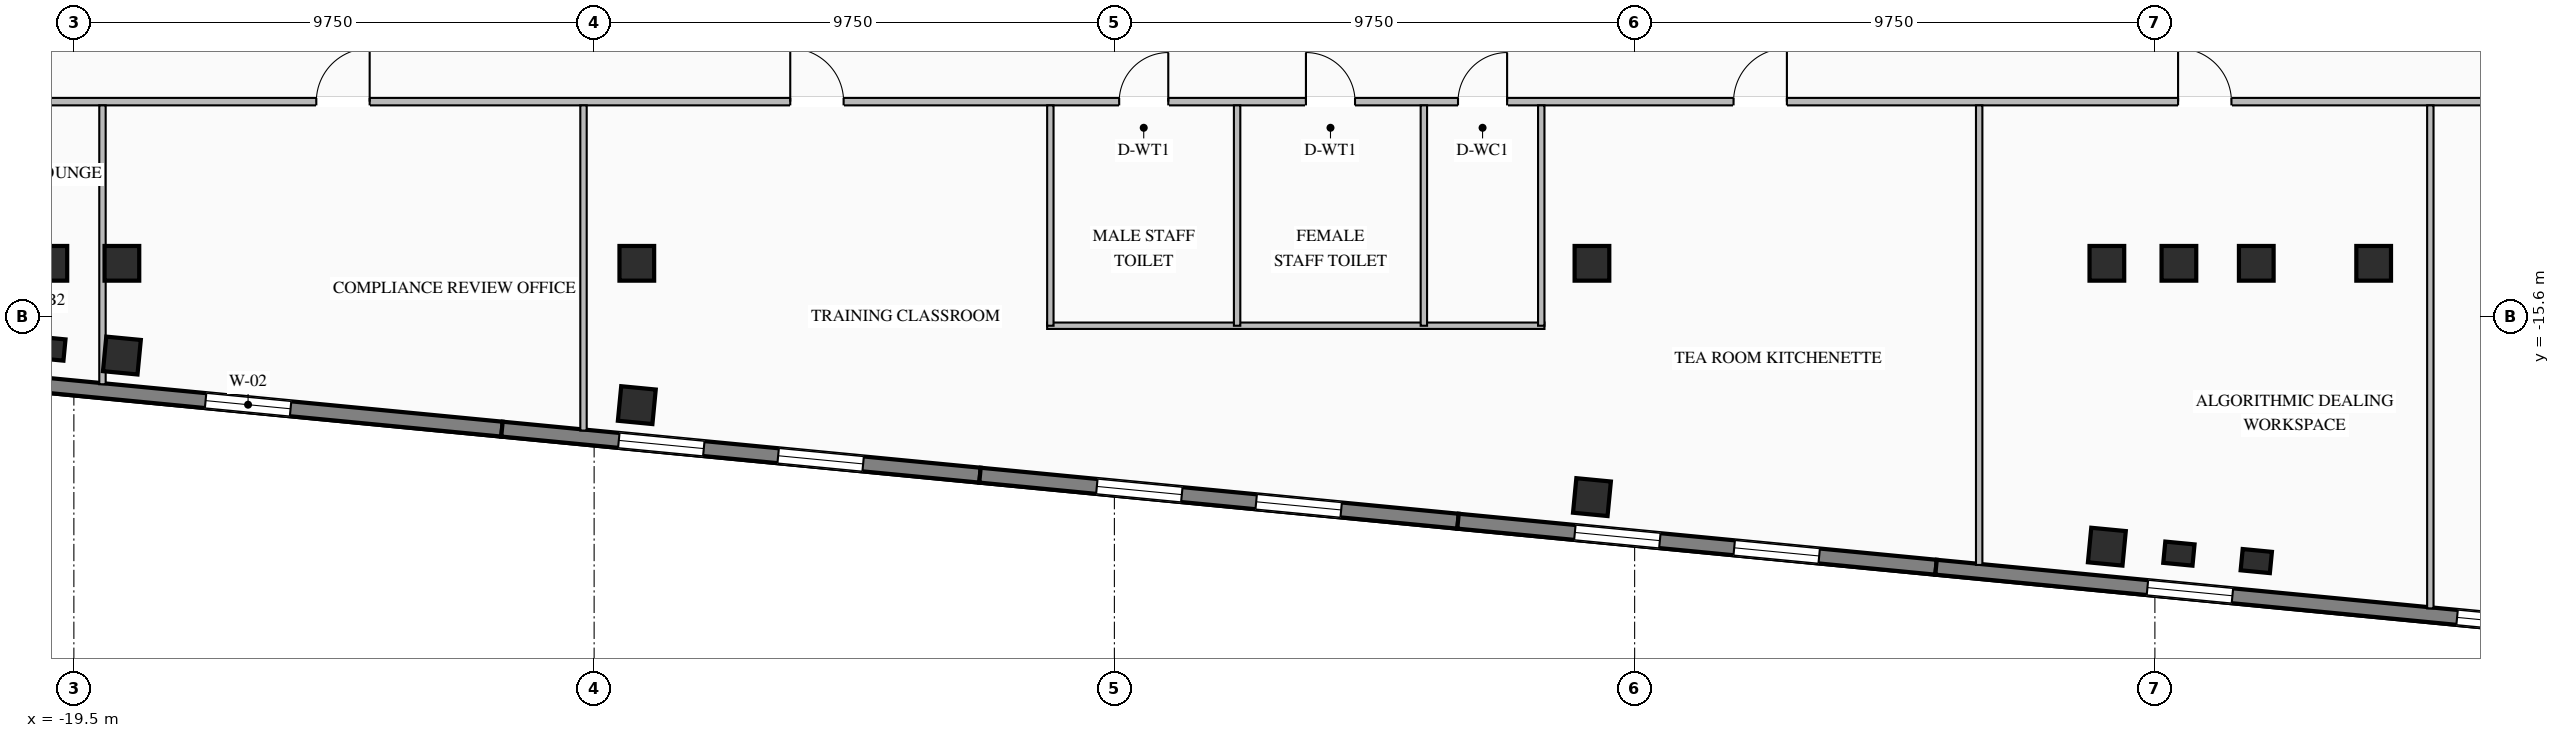
"""IFC4 building model, lengths in metres.
Left out: names, types, materials, properties, quantities, classifications, styles, units other than length and angle.
Written with IfcOpenShell. Run it as: python <this file> out.ifc"""

import sys

from ifc_helpers import new_model, si_unit, direction, frame, frame_2d, origin, origin_2d, place, context, subcontext, project, spatial, rectangle, i_section, extrude, element, fill, save


model = new_model("IFC4")
c1 = context("Model", 3, precision=1e-05, world=origin(), true_north=direction((0.0, 1.0)))
c2 = subcontext(c1, "Body", "Model", "MODEL_VIEW")
j1 = project(units=[si_unit("LENGTHUNIT", "METRE"), si_unit("PLANEANGLEUNIT", "RADIAN")], contexts=[c1])
p1 = place(None, origin())
s1 = spatial("IfcSite", under=j1, at=p1, CompositionType="ELEMENT")
p2 = place(p1, origin())
s2 = spatial("IfcBuilding", under=s1, at=p2, CompositionType="ELEMENT")
p3 = place(p2, frame((0.0, 0.0, 188.0)))
s3 = spatial("IfcBuildingStorey", under=s2, at=p3, CompositionType="ELEMENT", Elevation=188.0)
for number, where, z_axis, x_axis in (
    (1, (-19.95, -14.6, 0.0), (0.0, 0.0, 1.0), (1.0, 0.0, 0.0)),
    (2, (-18.6, -14.6, 0.0), (0.0, 0.0, 1.0), (1.0, 0.0, 0.0)),
    (3, (-8.95, -14.6, 0.0), (0.0, 0.0, 1.0), (1.0, 0.0, 0.0)),
    (4, (8.95, -14.6, 0.0), (0.0, 0.0, 1.0), (1.0, 0.0, 0.0)),
    (5, (18.6, -14.6, 0.0), (0.0, 0.0, 1.0), (1.0, 0.0, 0.0)),
    (6, (19.95, -14.6, 0.0), (0.0, 0.0, 1.0), (1.0, 0.0, 0.0)),
    (7, (21.4, -14.6, 0.0), (0.0, 0.0, 1.0), (1.0, 0.0, 0.0)),
    (8, (23.6, -14.6, 0.0), (0.0, 0.0, 1.0), (1.0, 0.0, 0.0)),
    (9, (-18.6, -16.329, 0.0), (0.0, 0.0, 1.0), (0.995, -0.096, 0.0)),
    (10, (-8.95, -17.258, 0.0), (0.0, 0.0, 1.0), (0.995, -0.096, 0.0)),
    (11, (8.95, -18.981, 0.0), (0.0, 0.0, 1.0), (0.995, -0.096, 0.0)),
    (12, (18.6, -19.911, 0.0), (0.0, 0.0, 1.0), (0.995, -0.096, 0.0)),
):
    element("IfcColumn", number, at=place(p3, frame(where, z_axis=z_axis, x_axis=x_axis)), inside=s3, PredefinedType="COLUMN", context=c2, shape_type="SweptSolid", body=[
        extrude(i_section(OverallWidth=0.65, OverallDepth=0.65, WebThickness=0.028, FlangeThickness=0.04, at=origin_2d()), origin(), (0.0, 0.0, 1.0), 3.45),
    ])
for number, where, z_axis, x_axis in (
    (13, (-19.95, -16.199, 0.0), (0.0, 0.0, 1.0), (0.995, -0.096, 0.0)),
    (14, (19.95, -20.041, 0.0), (0.0, 0.0, 1.0), (0.995, -0.096, 0.0)),
    (15, (21.4, -20.18, 0.0), (0.0, 0.0, 1.0), (0.995, -0.096, 0.0)),
):
    element("IfcColumn", number, at=place(p3, frame(where, z_axis=z_axis, x_axis=x_axis)), inside=s3, PredefinedType="PILASTER", context=c2, shape_type="SweptSolid", body=[
        extrude(rectangle(XDim=0.55, YDim=0.4, at=origin_2d()), origin(), (0.0, 0.0, 1.0), 3.45),
    ])
p4 = place(p3, frame((-11.477, -17.708, 0.0), z_axis=(0.0, 0.0, 1.0), x_axis=(-0.995395762701, 0.095850276977, 0.0)))
e16 = element("IfcWall", 16, at=p4, inside=s3, PredefinedType="STANDARD", context=c2, shape_type="SweptSolid", body=[
    extrude(rectangle(XDim=14.34, YDim=0.28, at=frame_2d((7.17, 0.0))), origin(), (0.0, 0.0, 1.0), 3.25),
])
p5 = place(p4, frame((3.98, 0.0, 0.76)))
e17 = element("IfcOpeningElement", 17, at=p5, cuts=e16, PredefinedType="OPENING", context=c2, shape_type="SweptSolid", body=[
    extrude(rectangle(XDim=1.6, YDim=1.95, at=frame_2d((0.8, 0.975))), frame((0.0, 0.15, 0.0), z_axis=(0.0, -1.0, 0.0), x_axis=(1.0, 0.0, 0.0)), (0.0, 0.0, 1.0), 0.3),
])
p6 = place(p4, frame((8.76, 0.0, 0.76)))
e18 = element("IfcOpeningElement", 18, at=p6, cuts=e16, PredefinedType="OPENING", context=c2, shape_type="SweptSolid", body=[
    extrude(rectangle(XDim=1.6, YDim=1.95, at=frame_2d((0.8, 0.975))), frame((0.0, 0.15, 0.0), z_axis=(0.0, -1.0, 0.0), x_axis=(1.0, 0.0, 0.0)), (0.0, 0.0, 1.0), 0.3),
])
p7 = place(p3, frame((-2.519, -18.57, 0.0), z_axis=(0.0, 0.0, 1.0), x_axis=(-0.995396794462, 0.09583956164, 0.0)))
e19 = element("IfcWall", 19, at=p7, inside=s3, PredefinedType="STANDARD", context=c2, shape_type="SweptSolid", body=[
    extrude(rectangle(XDim=9.0, YDim=0.28, at=frame_2d((4.5, 0.0))), origin(), (0.0, 0.0, 1.0), 3.25),
])
p8 = place(p7, frame((2.2, 0.0, 0.76)))
e20 = element("IfcOpeningElement", 20, at=p8, cuts=e19, PredefinedType="OPENING", context=c2, shape_type="SweptSolid", body=[
    extrude(rectangle(XDim=1.6, YDim=1.95, at=frame_2d((0.8, 0.975))), frame((0.0, 0.15, 0.0), z_axis=(0.0, -1.0, 0.0), x_axis=(1.0, 0.0, 0.0)), (0.0, 0.0, 1.0), 0.3),
])
p9 = place(p7, frame((5.2, 0.0, 0.76)))
e21 = element("IfcOpeningElement", 21, at=p9, cuts=e19, PredefinedType="OPENING", context=c2, shape_type="SweptSolid", body=[
    extrude(rectangle(XDim=1.6, YDim=1.95, at=frame_2d((0.8, 0.975))), frame((0.0, 0.15, 0.0), z_axis=(0.0, -1.0, 0.0), x_axis=(1.0, 0.0, 0.0)), (0.0, 0.0, 1.0), 0.3),
])
p10 = place(p3, frame((6.44, -19.433, 0.0), z_axis=(0.0, 0.0, 1.0), x_axis=(-0.995396794462, 0.09583956164, 0.0)))
e22 = element("IfcWall", 22, at=p10, inside=s3, PredefinedType="STANDARD", context=c2, shape_type="SweptSolid", body=[
    extrude(rectangle(XDim=9.0, YDim=0.28, at=frame_2d((4.5, 0.0))), origin(), (0.0, 0.0, 1.0), 3.25),
])
p11 = place(p10, frame((2.2, 0.0, 0.76)))
e23 = element("IfcOpeningElement", 23, at=p11, cuts=e22, PredefinedType="OPENING", context=c2, shape_type="SweptSolid", body=[
    extrude(rectangle(XDim=1.6, YDim=1.95, at=frame_2d((0.8, 0.975))), frame((0.0, 0.15, 0.0), z_axis=(0.0, -1.0, 0.0), x_axis=(1.0, 0.0, 0.0)), (0.0, 0.0, 1.0), 0.3),
])
p12 = place(p10, frame((5.2, 0.0, 0.76)))
e24 = element("IfcOpeningElement", 24, at=p12, cuts=e22, PredefinedType="OPENING", context=c2, shape_type="SweptSolid", body=[
    extrude(rectangle(XDim=1.6, YDim=1.95, at=frame_2d((0.8, 0.975))), frame((0.0, 0.15, 0.0), z_axis=(0.0, -1.0, 0.0), x_axis=(1.0, 0.0, 0.0)), (0.0, 0.0, 1.0), 0.3),
])
p13 = place(p3, frame((15.399, -20.296, 0.0), z_axis=(0.0, 0.0, 1.0), x_axis=(-0.995394455533, 0.09586385082, 0.0)))
e25 = element("IfcWall", 25, at=p13, inside=s3, PredefinedType="STANDARD", context=c2, shape_type="SweptSolid", body=[
    extrude(rectangle(XDim=9.0, YDim=0.28, at=frame_2d((4.5, 0.0))), origin(), (0.0, 0.0, 1.0), 3.25),
])
p14 = place(p13, frame((2.2, 0.0, 0.76)))
e26 = element("IfcOpeningElement", 26, at=p14, cuts=e25, PredefinedType="OPENING", context=c2, shape_type="SweptSolid", body=[
    extrude(rectangle(XDim=1.6, YDim=1.95, at=frame_2d((0.8, 0.975))), frame((0.0, 0.15, 0.0), z_axis=(0.0, -1.0, 0.0), x_axis=(1.0, 0.0, 0.0)), (0.0, 0.0, 1.0), 0.3),
])
p15 = place(p13, frame((5.2, 0.0, 0.76)))
e27 = element("IfcOpeningElement", 27, at=p15, cuts=e25, PredefinedType="OPENING", context=c2, shape_type="SweptSolid", body=[
    extrude(rectangle(XDim=1.6, YDim=1.95, at=frame_2d((0.8, 0.975))), frame((0.0, 0.15, 0.0), z_axis=(0.0, -1.0, 0.0), x_axis=(1.0, 0.0, 0.0)), (0.0, 0.0, 1.0), 0.3),
])
p16 = place(p3, frame((29.673, -21.67, 0.0), z_axis=(0.0, 0.0, 1.0), x_axis=(-0.995397230529, 0.095835032509, 0.0)))
e28 = element("IfcWall", 28, at=p16, inside=s3, PredefinedType="STANDARD", context=c2, shape_type="SweptSolid", body=[
    extrude(rectangle(XDim=14.34, YDim=0.28, at=frame_2d((7.17, 0.0))), origin(), (0.0, 0.0, 1.0), 3.25),
])
p17 = place(p16, frame((2.93, 0.0, 0.76)))
e29 = element("IfcOpeningElement", 29, at=p17, cuts=e28, PredefinedType="OPENING", context=c2, shape_type="SweptSolid", body=[
    extrude(rectangle(XDim=1.6, YDim=1.95, at=frame_2d((0.8, 0.975))), frame((0.0, 0.15, 0.0), z_axis=(0.0, -1.0, 0.0), x_axis=(1.0, 0.0, 0.0)), (0.0, 0.0, 1.0), 0.3),
])
p18 = place(p16, frame((8.76, 0.0, 0.76)))
e30 = element("IfcOpeningElement", 30, at=p18, cuts=e28, PredefinedType="OPENING", context=c2, shape_type="SweptSolid", body=[
    extrude(rectangle(XDim=1.6, YDim=1.95, at=frame_2d((0.8, 0.975))), frame((0.0, 0.15, 0.0), z_axis=(0.0, -1.0, 0.0), x_axis=(1.0, 0.0, 0.0)), (0.0, 0.0, 1.0), 0.3),
])
p19 = place(p3, frame((-27.583, -11.57, 0.0), z_axis=(0.0, 0.0, 1.0), x_axis=(1.0, 0.0, 0.0)))
e31 = element("IfcWall", 31, at=p19, inside=s3, PredefinedType="STANDARD", context=c2, shape_type="SweptSolid", body=[
    extrude(rectangle(XDim=60.519, YDim=0.14, at=frame_2d((30.259, 0.0))), origin(), (0.0, 0.0, 1.0), 3.25),
])
p20 = place(p19, frame((27.673, 0.0, 0.0)))
e32 = element("IfcOpeningElement", 32, at=p20, cuts=e31, PredefinedType="OPENING", context=c2, shape_type="SweptSolid", body=[
    extrude(rectangle(XDim=0.92, YDim=2.08, at=frame_2d((0.46, 1.04))), frame((0.0, 0.08, 0.0), z_axis=(0.0, -1.0, 0.0), x_axis=(1.0, 0.0, 0.0)), (0.0, 0.0, 1.0), 0.16),
])
p21 = place(p19, frame((31.173, 0.0, 0.0)))
e33 = element("IfcOpeningElement", 33, at=p21, cuts=e31, PredefinedType="OPENING", context=c2, shape_type="SweptSolid", body=[
    extrude(rectangle(XDim=0.92, YDim=2.08, at=frame_2d((0.46, 1.04))), frame((0.0, 0.08, 0.0), z_axis=(0.0, -1.0, 0.0), x_axis=(1.0, 0.0, 0.0)), (0.0, 0.0, 1.0), 0.16),
])
p22 = place(p19, frame((34.023, 0.0, 0.0)))
e34 = element("IfcOpeningElement", 34, at=p22, cuts=e31, PredefinedType="OPENING", context=c2, shape_type="SweptSolid", body=[
    extrude(rectangle(XDim=0.92, YDim=2.08, at=frame_2d((0.46, 1.04))), frame((0.0, 0.08, 0.0), z_axis=(0.0, -1.0, 0.0), x_axis=(1.0, 0.0, 0.0)), (0.0, 0.0, 1.0), 0.16),
])
p23 = place(p19, frame((3.936, 0.0, 0.0)))
e35 = element("IfcOpeningElement", 35, at=p23, cuts=e31, PredefinedType="OPENING", context=c2, shape_type="SweptSolid", body=[
    extrude(rectangle(XDim=1.0, YDim=2.08, at=frame_2d((0.5, 1.04))), frame((0.0, 0.08, 0.0), z_axis=(0.0, -1.0, 0.0), x_axis=(1.0, 0.0, 0.0)), (0.0, 0.0, 1.0), 0.16),
])
p24 = place(p19, frame((12.626, 0.0, 0.0)))
e36 = element("IfcOpeningElement", 36, at=p24, cuts=e31, PredefinedType="OPENING", context=c2, shape_type="SweptSolid", body=[
    extrude(rectangle(XDim=1.0, YDim=2.08, at=frame_2d((0.5, 1.04))), frame((0.0, 0.08, 0.0), z_axis=(0.0, -1.0, 0.0), x_axis=(1.0, 0.0, 0.0)), (0.0, 0.0, 1.0), 0.16),
])
p25 = place(p19, frame((21.509, 0.0, 0.0)))
e37 = element("IfcOpeningElement", 37, at=p25, cuts=e31, PredefinedType="OPENING", context=c2, shape_type="SweptSolid", body=[
    extrude(rectangle(XDim=1.0, YDim=2.08, at=frame_2d((0.5, 1.04))), frame((0.0, 0.08, 0.0), z_axis=(0.0, -1.0, 0.0), x_axis=(1.0, 0.0, 0.0)), (0.0, 0.0, 1.0), 0.16),
])
p26 = place(p19, frame((39.187, 0.0, 0.0)))
e38 = element("IfcOpeningElement", 38, at=p26, cuts=e31, PredefinedType="OPENING", context=c2, shape_type="SweptSolid", body=[
    extrude(rectangle(XDim=1.0, YDim=2.08, at=frame_2d((0.5, 1.04))), frame((0.0, 0.08, 0.0), z_axis=(0.0, -1.0, 0.0), x_axis=(1.0, 0.0, 0.0)), (0.0, 0.0, 1.0), 0.16),
])
p27 = place(p19, frame((47.518, 0.0, 0.0)))
e39 = element("IfcOpeningElement", 39, at=p27, cuts=e31, PredefinedType="OPENING", context=c2, shape_type="SweptSolid", body=[
    extrude(rectangle(XDim=1.0, YDim=2.08, at=frame_2d((0.5, 1.04))), frame((0.0, 0.08, 0.0), z_axis=(0.0, -1.0, 0.0), x_axis=(1.0, 0.0, 0.0)), (0.0, 0.0, 1.0), 0.16),
])
p28 = place(p19, frame((55.756, 0.0, 0.0)))
e40 = element("IfcOpeningElement", 40, at=p28, cuts=e31, PredefinedType="OPENING", context=c2, shape_type="SweptSolid", body=[
    extrude(rectangle(XDim=1.0, YDim=2.08, at=frame_2d((0.5, 1.04))), frame((0.0, 0.08, 0.0), z_axis=(0.0, -1.0, 0.0), x_axis=(1.0, 0.0, 0.0)), (0.0, 0.0, 1.0), 0.16),
])
p29 = place(p3, frame((-1.26, -15.77, 0.0), z_axis=(0.0, 0.0, 1.0), x_axis=(1.0, 0.0, 0.0)))
e41 = element("IfcWall", 41, at=p29, inside=s3, PredefinedType="STANDARD", context=c2, shape_type="SweptSolid", body=[
    extrude(rectangle(XDim=9.32, YDim=0.12, at=frame_2d((4.66, 0.0))), origin(), (0.0, 0.0, 1.0), 3.25),
])
for number, where, z_axis, x_axis in (
    (42, (-1.2, -15.77, 0.0), (0.0, 0.0, 1.0), (0.0, 1.0, 0.0)),
    (43, (2.3, -15.77, 0.0), (0.0, 0.0, 1.0), (0.0, 1.0, 0.0)),
    (44, (5.8, -15.77, 0.0), (0.0, 0.0, 1.0), (0.0, 1.0, 0.0)),
    (45, (8.0, -15.77, 0.0), (0.0, 0.0, 1.0), (0.0, 1.0, 0.0)),
):
    element("IfcWall", number, at=place(p3, frame(where, z_axis=z_axis, x_axis=x_axis)), inside=s3, PredefinedType="STANDARD", context=c2, shape_type="SweptSolid", body=[
        extrude(rectangle(XDim=4.13, YDim=0.12, at=frame_2d((2.065, 0.0))), origin(), (0.0, 0.0, 1.0), 3.25),
    ])
p30 = place(p3, frame((-18.964, -16.866, 0.0), z_axis=(0.0, 0.0, 1.0), x_axis=(0.0, 1.0, 0.0)))
e46 = element("IfcWall", 46, at=p30, inside=s3, PredefinedType="STANDARD", context=c2, shape_type="SweptSolid", body=[
    extrude(rectangle(XDim=5.226, YDim=0.12, at=frame_2d((2.613, 0.0))), origin(), (0.0, 0.0, 1.0), 3.25),
])
p31 = place(p3, frame((-9.949, -17.734, 0.0), z_axis=(0.0, 0.0, 1.0), x_axis=(0.0, 1.0, 0.0)))
e47 = element("IfcWall", 47, at=p31, inside=s3, PredefinedType="STANDARD", context=c2, shape_type="SweptSolid", body=[
    extrude(rectangle(XDim=6.094, YDim=0.12, at=frame_2d((3.047, 0.0))), origin(), (0.0, 0.0, 1.0), 3.25),
])
p32 = place(p3, frame((16.207, -20.253, 0.0), z_axis=(0.0, 0.0, 1.0), x_axis=(0.0, 1.0, 0.0)))
e48 = element("IfcWall", 48, at=p32, inside=s3, PredefinedType="STANDARD", context=c2, shape_type="SweptSolid", body=[
    extrude(rectangle(XDim=8.613, YDim=0.12, at=frame_2d((4.307, 0.0))), origin(), (0.0, 0.0, 1.0), 3.25),
])
p33 = place(p3, frame((24.662, -21.067, 0.0), z_axis=(0.0, 0.0, 1.0), x_axis=(0.0, 1.0, 0.0)))
e49 = element("IfcWall", 49, at=p33, inside=s3, PredefinedType="STANDARD", context=c2, shape_type="SweptSolid", body=[
    extrude(rectangle(XDim=9.427, YDim=0.12, at=frame_2d((4.713, 0.0))), origin(), (0.0, 0.0, 1.0), 3.25),
])
p34 = place(p5, origin())
e50 = element("IfcWindow", 50, at=p34, inside=s3, PartitioningType="SINGLE_PANEL", PredefinedType="WINDOW", context=c2, shape_type="SweptSolid", body=[
    extrude(rectangle(XDim=1.6, YDim=1.95, at=frame_2d((0.8, 0.975))), frame((0.0, 0.03, 0.0), z_axis=(0.0, -1.0, 0.0), x_axis=(1.0, 0.0, 0.0)), (0.0, 0.0, 1.0), 0.06),
])
fill(e17, e50)
p35 = place(p8, origin())
e51 = element("IfcWindow", 51, at=p35, inside=s3, PartitioningType="SINGLE_PANEL", PredefinedType="WINDOW", context=c2, shape_type="SweptSolid", body=[
    extrude(rectangle(XDim=1.6, YDim=1.95, at=frame_2d((0.8, 0.975))), frame((0.0, 0.03, 0.0), z_axis=(0.0, -1.0, 0.0), x_axis=(1.0, 0.0, 0.0)), (0.0, 0.0, 1.0), 0.06),
])
fill(e20, e51)
p36 = place(p9, origin())
e52 = element("IfcWindow", 52, at=p36, inside=s3, PartitioningType="SINGLE_PANEL", PredefinedType="WINDOW", context=c2, shape_type="SweptSolid", body=[
    extrude(rectangle(XDim=1.6, YDim=1.95, at=frame_2d((0.8, 0.975))), frame((0.0, 0.03, 0.0), z_axis=(0.0, -1.0, 0.0), x_axis=(1.0, 0.0, 0.0)), (0.0, 0.0, 1.0), 0.06),
])
fill(e21, e52)
p37 = place(p11, origin())
e53 = element("IfcWindow", 53, at=p37, inside=s3, PartitioningType="SINGLE_PANEL", PredefinedType="WINDOW", context=c2, shape_type="SweptSolid", body=[
    extrude(rectangle(XDim=1.6, YDim=1.95, at=frame_2d((0.8, 0.975))), frame((0.0, 0.03, 0.0), z_axis=(0.0, -1.0, 0.0), x_axis=(1.0, 0.0, 0.0)), (0.0, 0.0, 1.0), 0.06),
])
fill(e23, e53)
p38 = place(p12, origin())
e54 = element("IfcWindow", 54, at=p38, inside=s3, PartitioningType="SINGLE_PANEL", PredefinedType="WINDOW", context=c2, shape_type="SweptSolid", body=[
    extrude(rectangle(XDim=1.6, YDim=1.95, at=frame_2d((0.8, 0.975))), frame((0.0, 0.03, 0.0), z_axis=(0.0, -1.0, 0.0), x_axis=(1.0, 0.0, 0.0)), (0.0, 0.0, 1.0), 0.06),
])
fill(e24, e54)
p39 = place(p14, origin())
e55 = element("IfcWindow", 55, at=p39, inside=s3, PartitioningType="SINGLE_PANEL", PredefinedType="WINDOW", context=c2, shape_type="SweptSolid", body=[
    extrude(rectangle(XDim=1.6, YDim=1.95, at=frame_2d((0.8, 0.975))), frame((0.0, 0.03, 0.0), z_axis=(0.0, -1.0, 0.0), x_axis=(1.0, 0.0, 0.0)), (0.0, 0.0, 1.0), 0.06),
])
fill(e26, e55)
p40 = place(p15, origin())
e56 = element("IfcWindow", 56, at=p40, inside=s3, PartitioningType="SINGLE_PANEL", PredefinedType="WINDOW", context=c2, shape_type="SweptSolid", body=[
    extrude(rectangle(XDim=1.6, YDim=1.95, at=frame_2d((0.8, 0.975))), frame((0.0, 0.03, 0.0), z_axis=(0.0, -1.0, 0.0), x_axis=(1.0, 0.0, 0.0)), (0.0, 0.0, 1.0), 0.06),
])
fill(e27, e56)
p41 = place(p17, origin())
e57 = element("IfcWindow", 57, at=p41, inside=s3, PartitioningType="SINGLE_PANEL", PredefinedType="WINDOW", context=c2, shape_type="SweptSolid", body=[
    extrude(rectangle(XDim=1.6, YDim=1.95, at=frame_2d((0.8, 0.975))), frame((0.0, 0.03, 0.0), z_axis=(0.0, -1.0, 0.0), x_axis=(1.0, 0.0, 0.0)), (0.0, 0.0, 1.0), 0.06),
])
fill(e29, e57)
p42 = place(p18, origin())
e58 = element("IfcWindow", 58, at=p42, inside=s3, PartitioningType="SINGLE_PANEL", PredefinedType="WINDOW", context=c2, shape_type="SweptSolid", body=[
    extrude(rectangle(XDim=1.6, YDim=1.95, at=frame_2d((0.8, 0.975))), frame((0.0, 0.03, 0.0), z_axis=(0.0, -1.0, 0.0), x_axis=(1.0, 0.0, 0.0)), (0.0, 0.0, 1.0), 0.06),
])
fill(e30, e58)
p43 = place(p20, origin())
e59 = element("IfcDoor", 59, at=p43, inside=s3, OperationType="SINGLE_SWING_RIGHT", PredefinedType="DOOR", context=c2, shape_type="SweptSolid", body=[
    extrude(rectangle(XDim=0.92, YDim=2.08, at=frame_2d((0.46, 1.04))), frame((0.0, 0.025, 0.0), z_axis=(0.0, -1.0, 0.0), x_axis=(1.0, 0.0, 0.0)), (0.0, 0.0, 1.0), 0.05),
])
fill(e32, e59)
p44 = place(p21, origin())
e60 = element("IfcDoor", 60, at=p44, inside=s3, OperationType="SINGLE_SWING_LEFT", PredefinedType="DOOR", context=c2, shape_type="SweptSolid", body=[
    extrude(rectangle(XDim=0.92, YDim=2.08, at=frame_2d((0.46, 1.04))), frame((0.0, 0.025, 0.0), z_axis=(0.0, -1.0, 0.0), x_axis=(1.0, 0.0, 0.0)), (0.0, 0.0, 1.0), 0.05),
])
fill(e33, e60)
p45 = place(p22, origin())
e61 = element("IfcDoor", 61, at=p45, inside=s3, OperationType="SINGLE_SWING_RIGHT", PredefinedType="DOOR", context=c2, shape_type="SweptSolid", body=[
    extrude(rectangle(XDim=0.92, YDim=2.08, at=frame_2d((0.46, 1.04))), frame((0.0, 0.025, 0.0), z_axis=(0.0, -1.0, 0.0), x_axis=(1.0, 0.0, 0.0)), (0.0, 0.0, 1.0), 0.05),
])
fill(e34, e61)
p46 = place(p24, origin())
e62 = element("IfcDoor", 62, at=p46, inside=s3, OperationType="SINGLE_SWING_RIGHT", PredefinedType="DOOR", context=c2, shape_type="SweptSolid", body=[
    extrude(rectangle(XDim=1.0, YDim=2.08, at=frame_2d((0.5, 1.04))), frame((0.0, 0.025, 0.0), z_axis=(0.0, -1.0, 0.0), x_axis=(1.0, 0.0, 0.0)), (0.0, 0.0, 1.0), 0.05),
])
fill(e36, e62)
p47 = place(p25, origin())
e63 = element("IfcDoor", 63, at=p47, inside=s3, OperationType="SINGLE_SWING_LEFT", PredefinedType="DOOR", context=c2, shape_type="SweptSolid", body=[
    extrude(rectangle(XDim=1.0, YDim=2.08, at=frame_2d((0.5, 1.04))), frame((0.0, 0.025, 0.0), z_axis=(0.0, -1.0, 0.0), x_axis=(1.0, 0.0, 0.0)), (0.0, 0.0, 1.0), 0.05),
])
fill(e37, e63)
p48 = place(p26, origin())
e64 = element("IfcDoor", 64, at=p48, inside=s3, OperationType="SINGLE_SWING_RIGHT", PredefinedType="DOOR", context=c2, shape_type="SweptSolid", body=[
    extrude(rectangle(XDim=1.0, YDim=2.08, at=frame_2d((0.5, 1.04))), frame((0.0, 0.025, 0.0), z_axis=(0.0, -1.0, 0.0), x_axis=(1.0, 0.0, 0.0)), (0.0, 0.0, 1.0), 0.05),
])
fill(e38, e64)
p49 = place(p27, origin())
e65 = element("IfcDoor", 65, at=p49, inside=s3, OperationType="SINGLE_SWING_LEFT", PredefinedType="DOOR", context=c2, shape_type="SweptSolid", body=[
    extrude(rectangle(XDim=1.0, YDim=2.08, at=frame_2d((0.5, 1.04))), frame((0.0, 0.025, 0.0), z_axis=(0.0, -1.0, 0.0), x_axis=(1.0, 0.0, 0.0)), (0.0, 0.0, 1.0), 0.05),
])
fill(e39, e65)
save(model, sys.argv[1])
